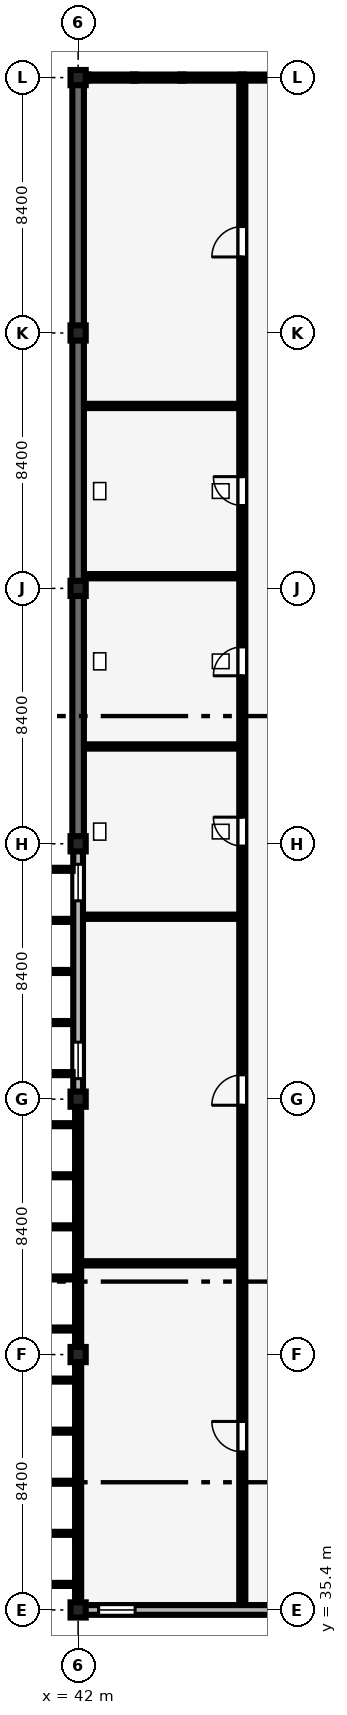
"""IFC4 building model, lengths in metres.
Left out: names, types, materials, properties, quantities, classifications, styles, units other than length and angle.
Written with IfcOpenShell. Run it as: python <this file> out.ifc"""

import sys

from ifc_helpers import new_model, si_unit, direction, frame, frame_2d, origin, origin_2d, place, context, subcontext, project, spatial, rectangle, extrude, element, fill, save


model = new_model("IFC4")
c1 = context("Model", 3, precision=1e-05, world=origin(), true_north=direction((0.0, 1.0)))
c2 = subcontext(c1, "Body", "Model", "MODEL_VIEW")
j1 = project(units=[si_unit("LENGTHUNIT", "METRE"), si_unit("PLANEANGLEUNIT", "RADIAN")], contexts=[c1])
p1 = place(None, origin())
s1 = spatial("IfcSite", under=j1, at=p1, CompositionType="ELEMENT")
p2 = place(p1, origin())
s2 = spatial("IfcBuilding", under=s1, at=p2, CompositionType="ELEMENT")
p3 = place(p2, frame((0.0, 0.0, 13.2)))
s3 = spatial("IfcBuildingStorey", under=s2, at=p3, CompositionType="ELEMENT", Elevation=13.2)
for number, where, z_axis, x_axis in (
    (1, (42.0, 35.4, 0.0), (0.0, 0.0, 1.0), (1.0, 0.0, 0.0)),
    (2, (42.0, 43.8, 0.0), (0.0, 0.0, 1.0), (1.0, 0.0, 0.0)),
    (3, (42.0, 52.2, 0.0), (0.0, 0.0, 1.0), (1.0, 0.0, 0.0)),
    (4, (42.0, 60.6, 0.0), (0.0, 0.0, 1.0), (1.0, 0.0, 0.0)),
    (5, (42.0, 69.0, 0.0), (0.0, 0.0, 1.0), (1.0, 0.0, 0.0)),
    (6, (42.0, 77.4, 0.0), (0.0, 0.0, 1.0), (1.0, 0.0, 0.0)),
    (7, (42.0, 85.8, 0.0), (0.0, 0.0, 1.0), (1.0, 0.0, 0.0)),
):
    element("IfcColumn", number, at=place(p3, frame(where, z_axis=z_axis, x_axis=x_axis)), inside=s3, PredefinedType="COLUMN", context=c2, shape_type="SweptSolid", body=[
        extrude(rectangle(XDim=0.5, YDim=0.5, at=origin_2d()), origin(), (0.0, 0.0, 1.0), 4.2),
    ])
p4 = place(p3, frame((42.0, 52.425, 0.0), z_axis=(0.0, 0.0, 1.0), x_axis=(0.0, 1.0, 0.0)))
e8 = element("IfcWall", 8, at=p4, inside=s3, PredefinedType="SOLIDWALL", context=c2, shape_type="SweptSolid", body=[
    extrude(rectangle(XDim=7.95, YDim=0.32, at=frame_2d((3.975, 0.0))), origin(), (0.0, 0.0, 1.0), 3.16),
])
p5 = place(p4, frame((0.45, 0.0, 0.85)))
e9 = element("IfcOpeningElement", 9, at=p5, cuts=e8, PredefinedType="OPENING", context=c2, shape_type="SweptSolid", body=[
    extrude(rectangle(XDim=1.2, YDim=1.5, at=frame_2d((0.6, 0.75))), frame((0.0, 0.17, 0.0), z_axis=(0.0, -1.0, 0.0), x_axis=(1.0, 0.0, 0.0)), (0.0, 0.0, 1.0), 0.34),
])
p6 = place(p4, frame((6.3, 0.0, 0.85)))
e10 = element("IfcOpeningElement", 10, at=p6, cuts=e8, PredefinedType="OPENING", context=c2, shape_type="SweptSolid", body=[
    extrude(rectangle(XDim=1.2, YDim=1.5, at=frame_2d((0.6, 0.75))), frame((0.0, 0.17, 0.0), z_axis=(0.0, -1.0, 0.0), x_axis=(1.0, 0.0, 0.0)), (0.0, 0.0, 1.0), 0.34),
])
for number, where, z_axis, x_axis in (
    (11, (42.0, 60.825, 0.0), (0.0, 0.0, 1.0), (0.0, 1.0, 0.0)),
    (12, (42.0, 69.225, 0.0), (0.0, 0.0, 1.0), (0.0, 1.0, 0.0)),
):
    element("IfcWall", number, at=place(p3, frame(where, z_axis=z_axis, x_axis=x_axis)), inside=s3, PredefinedType="SHEAR", context=c2, shape_type="SweptSolid", body=[
        extrude(rectangle(XDim=7.95, YDim=0.38, at=frame_2d((3.975, 0.0))), origin(), (0.0, 0.0, 1.0), 3.11),
    ])
p7 = place(p3, frame((42.0, 77.625, 0.0), z_axis=(0.0, 0.0, 1.0), x_axis=(0.0, 1.0, 0.0)))
e13 = element("IfcWall", 13, at=p7, inside=s3, PredefinedType="SHEAR", context=c2, shape_type="SweptSolid", body=[
    extrude(rectangle(XDim=7.95, YDim=0.38, at=frame_2d((3.975, 0.0))), origin(), (0.0, 0.0, 1.0), 3.06),
])
p8 = place(p3, frame((42.225, 35.4, 0.0), z_axis=(0.0, 0.0, 1.0), x_axis=(1.0, 0.0, 0.0)))
e14 = element("IfcWall", 14, at=p8, inside=s3, PredefinedType="SOLIDWALL", context=c2, shape_type="SweptSolid", body=[
    extrude(rectangle(XDim=7.95, YDim=0.32, at=frame_2d((3.975, 0.0))), origin(), (0.0, 0.0, 1.0), 2.98),
])
p9 = place(p8, frame((0.45, 0.0, 0.9)))
e15 = element("IfcOpeningElement", 15, at=p9, cuts=e14, PredefinedType="OPENING", context=c2, shape_type="SweptSolid", body=[
    extrude(rectangle(XDim=1.2, YDim=1.5, at=frame_2d((0.6, 0.75))), frame((0.0, 0.17, 0.0), z_axis=(0.0, -1.0, 0.0), x_axis=(1.0, 0.0, 0.0)), (0.0, 0.0, 1.0), 0.34),
])
p10 = place(p8, frame((6.3, 0.0, 0.9)))
e16 = element("IfcOpeningElement", 16, at=p10, cuts=e14, PredefinedType="OPENING", context=c2, shape_type="SweptSolid", body=[
    extrude(rectangle(XDim=1.2, YDim=1.8, at=frame_2d((0.6, 0.9))), frame((0.0, 0.17, 0.0), z_axis=(0.0, -1.0, 0.0), x_axis=(1.0, 0.0, 0.0)), (0.0, 0.0, 1.0), 0.34),
])
p11 = place(p3, frame((42.105, 46.8, 0.0), z_axis=(0.0, 0.0, 1.0), x_axis=(1.0, 0.0, 0.0)))
e17 = element("IfcWall", 17, at=p11, inside=s3, PredefinedType="PARTITIONING", context=c2, shape_type="SweptSolid", body=[
    extrude(rectangle(XDim=5.19, YDim=0.14, at=frame_2d((2.595, 0.0))), origin(), (0.0, 0.0, 1.0), 3.51),
])
p12 = place(p3, frame((42.165, 58.2, 0.0), z_axis=(0.0, 0.0, 1.0), x_axis=(1.0, 0.0, 0.0)))
e18 = element("IfcWall", 18, at=p12, inside=s3, PredefinedType="PARTITIONING", context=c2, shape_type="SweptSolid", body=[
    extrude(rectangle(XDim=5.13, YDim=0.14, at=frame_2d((2.565, 0.0))), origin(), (0.0, 0.0, 1.0), 3.9),
])
p13 = place(p3, frame((42.195, 63.8, 0.0), z_axis=(0.0, 0.0, 1.0), x_axis=(1.0, 0.0, 0.0)))
e19 = element("IfcWall", 19, at=p13, inside=s3, PredefinedType="PARTITIONING", context=c2, shape_type="SweptSolid", body=[
    extrude(rectangle(XDim=5.1, YDim=0.14, at=frame_2d((2.55, 0.0))), origin(), (0.0, 0.0, 1.0), 3.51),
])
for number, where, z_axis, x_axis in (
    (20, (42.195, 69.4, 0.0), (0.0, 0.0, 1.0), (1.0, 0.0, 0.0)),
    (21, (42.195, 75.0, 0.0), (0.0, 0.0, 1.0), (1.0, 0.0, 0.0)),
):
    element("IfcWall", number, at=place(p3, frame(where, z_axis=z_axis, x_axis=x_axis)), inside=s3, PredefinedType="PARTITIONING", context=c2, shape_type="SweptSolid", body=[
        extrude(rectangle(XDim=5.1, YDim=0.14, at=frame_2d((2.55, 0.0))), origin(), (0.0, 0.0, 1.0), 3.9),
    ])
p14 = place(p3, frame((47.4, 35.565, 0.0), z_axis=(0.0, 0.0, 1.0), x_axis=(0.0, 1.0, 0.0)))
e22 = element("IfcWall", 22, at=p14, inside=s3, PredefinedType="PARTITIONING", context=c2, shape_type="SweptSolid", body=[
    extrude(rectangle(XDim=50.13, YDim=0.2, at=frame_2d((25.065, 0.0))), origin(), (0.0, 0.0, 1.0), 3.9),
])
p15 = place(p14, frame((5.035, 0.0, 0.0)))
e23 = element("IfcOpeningElement", 23, at=p15, cuts=e22, PredefinedType="OPENING", context=c2, shape_type="SweptSolid", body=[
    extrude(rectangle(XDim=1.0, YDim=2.15, at=frame_2d((0.5, 1.075))), frame((0.0, 0.11, 0.0), z_axis=(0.0, -1.0, 0.0), x_axis=(1.0, 0.0, 0.0)), (0.0, 0.0, 1.0), 0.22),
])
p16 = place(p14, frame((16.435, 0.0, 0.0)))
e24 = element("IfcOpeningElement", 24, at=p16, cuts=e22, PredefinedType="OPENING", context=c2, shape_type="SweptSolid", body=[
    extrude(rectangle(XDim=1.0, YDim=2.15, at=frame_2d((0.5, 1.075))), frame((0.0, 0.11, 0.0), z_axis=(0.0, -1.0, 0.0), x_axis=(1.0, 0.0, 0.0)), (0.0, 0.0, 1.0), 0.22),
])
p17 = place(p14, frame((24.96, 0.0, 0.0)))
e25 = element("IfcOpeningElement", 25, at=p17, cuts=e22, PredefinedType="OPENING", context=c2, shape_type="SweptSolid", body=[
    extrude(rectangle(XDim=0.95, YDim=2.2, at=frame_2d((0.475, 1.1))), frame((0.0, 0.11, 0.0), z_axis=(0.0, -1.0, 0.0), x_axis=(1.0, 0.0, 0.0)), (0.0, 0.0, 1.0), 0.22),
])
p18 = place(p14, frame((30.56, 0.0, 0.0)))
e26 = element("IfcOpeningElement", 26, at=p18, cuts=e22, PredefinedType="OPENING", context=c2, shape_type="SweptSolid", body=[
    extrude(rectangle(XDim=0.95, YDim=2.2, at=frame_2d((0.475, 1.1))), frame((0.0, 0.11, 0.0), z_axis=(0.0, -1.0, 0.0), x_axis=(1.0, 0.0, 0.0)), (0.0, 0.0, 1.0), 0.22),
])
p19 = place(p14, frame((36.16, 0.0, 0.0)))
e27 = element("IfcOpeningElement", 27, at=p19, cuts=e22, PredefinedType="OPENING", context=c2, shape_type="SweptSolid", body=[
    extrude(rectangle(XDim=0.95, YDim=2.1, at=frame_2d((0.475, 1.05))), frame((0.0, 0.11, 0.0), z_axis=(0.0, -1.0, 0.0), x_axis=(1.0, 0.0, 0.0)), (0.0, 0.0, 1.0), 0.22),
])
p20 = place(p14, frame((44.335, 0.0, 0.0)))
e28 = element("IfcOpeningElement", 28, at=p20, cuts=e22, PredefinedType="OPENING", context=c2, shape_type="SweptSolid", body=[
    extrude(rectangle(XDim=1.0, YDim=2.15, at=frame_2d((0.5, 1.075))), frame((0.0, 0.11, 0.0), z_axis=(0.0, -1.0, 0.0), x_axis=(1.0, 0.0, 0.0)), (0.0, 0.0, 1.0), 0.22),
])
p21 = place(p5, origin())
e29 = element("IfcWindow", 29, at=p21, inside=s3, PartitioningType="SINGLE_PANEL", PredefinedType="WINDOW", context=c2, shape_type="SweptSolid", body=[
    extrude(rectangle(XDim=1.2, YDim=1.5, at=frame_2d((0.6, 0.75))), frame((0.0, 0.03, 0.0), z_axis=(0.0, -1.0, 0.0), x_axis=(1.0, 0.0, 0.0)), (0.0, 0.0, 1.0), 0.06),
])
fill(e9, e29)
p22 = place(p6, origin())
e30 = element("IfcWindow", 30, at=p22, inside=s3, PartitioningType="SINGLE_PANEL", PredefinedType="WINDOW", context=c2, shape_type="SweptSolid", body=[
    extrude(rectangle(XDim=1.2, YDim=1.5, at=frame_2d((0.6, 0.75))), frame((0.0, 0.03, 0.0), z_axis=(0.0, -1.0, 0.0), x_axis=(1.0, 0.0, 0.0)), (0.0, 0.0, 1.0), 0.06),
])
fill(e10, e30)
p23 = place(p9, origin())
e31 = element("IfcWindow", 31, at=p23, inside=s3, PartitioningType="SINGLE_PANEL", PredefinedType="WINDOW", context=c2, shape_type="SweptSolid", body=[
    extrude(rectangle(XDim=1.2, YDim=1.5, at=frame_2d((0.6, 0.75))), frame((0.0, 0.03, 0.0), z_axis=(0.0, -1.0, 0.0), x_axis=(1.0, 0.0, 0.0)), (0.0, 0.0, 1.0), 0.06),
])
fill(e15, e31)
p24 = place(p15, origin())
e32 = element("IfcDoor", 32, at=p24, inside=s3, OperationType="SINGLE_SWING_RIGHT", PredefinedType="DOOR", context=c2, shape_type="SweptSolid", body=[
    extrude(rectangle(XDim=1.0, YDim=2.15, at=frame_2d((0.5, 1.075))), frame((0.0, 0.025, 0.0), z_axis=(0.0, -1.0, 0.0), x_axis=(1.0, 0.0, 0.0)), (0.0, 0.0, 1.0), 0.05),
])
fill(e23, e32)
p25 = place(p16, origin())
e33 = element("IfcDoor", 33, at=p25, inside=s3, OperationType="SINGLE_SWING_LEFT", PredefinedType="DOOR", context=c2, shape_type="SweptSolid", body=[
    extrude(rectangle(XDim=1.0, YDim=2.15, at=frame_2d((0.5, 1.075))), frame((0.0, 0.025, 0.0), z_axis=(0.0, -1.0, 0.0), x_axis=(1.0, 0.0, 0.0)), (0.0, 0.0, 1.0), 0.05),
])
fill(e24, e33)
p26 = place(p17, origin())
e34 = element("IfcDoor", 34, at=p26, inside=s3, OperationType="SINGLE_SWING_RIGHT", PredefinedType="DOOR", context=c2, shape_type="SweptSolid", body=[
    extrude(rectangle(XDim=0.95, YDim=2.2, at=frame_2d((0.475, 1.1))), frame((0.0, 0.025, 0.0), z_axis=(0.0, -1.0, 0.0), x_axis=(1.0, 0.0, 0.0)), (0.0, 0.0, 1.0), 0.05),
])
fill(e25, e34)
p27 = place(p18, origin())
e35 = element("IfcDoor", 35, at=p27, inside=s3, OperationType="SINGLE_SWING_LEFT", PredefinedType="DOOR", context=c2, shape_type="SweptSolid", body=[
    extrude(rectangle(XDim=0.95, YDim=2.2, at=frame_2d((0.475, 1.1))), frame((0.0, 0.025, 0.0), z_axis=(0.0, -1.0, 0.0), x_axis=(1.0, 0.0, 0.0)), (0.0, 0.0, 1.0), 0.05),
])
fill(e26, e35)
p28 = place(p19, origin())
e36 = element("IfcDoor", 36, at=p28, inside=s3, OperationType="SINGLE_SWING_RIGHT", PredefinedType="DOOR", context=c2, shape_type="SweptSolid", body=[
    extrude(rectangle(XDim=0.95, YDim=2.1, at=frame_2d((0.475, 1.05))), frame((0.0, 0.025, 0.0), z_axis=(0.0, -1.0, 0.0), x_axis=(1.0, 0.0, 0.0)), (0.0, 0.0, 1.0), 0.05),
])
fill(e27, e36)
p29 = place(p20, origin())
e37 = element("IfcDoor", 37, at=p29, inside=s3, OperationType="SINGLE_SWING_LEFT", PredefinedType="DOOR", context=c2, shape_type="SweptSolid", body=[
    extrude(rectangle(XDim=1.0, YDim=2.15, at=frame_2d((0.5, 1.075))), frame((0.0, 0.025, 0.0), z_axis=(0.0, -1.0, 0.0), x_axis=(1.0, 0.0, 0.0)), (0.0, 0.0, 1.0), 0.05),
])
fill(e28, e37)
save(model, sys.argv[1])
